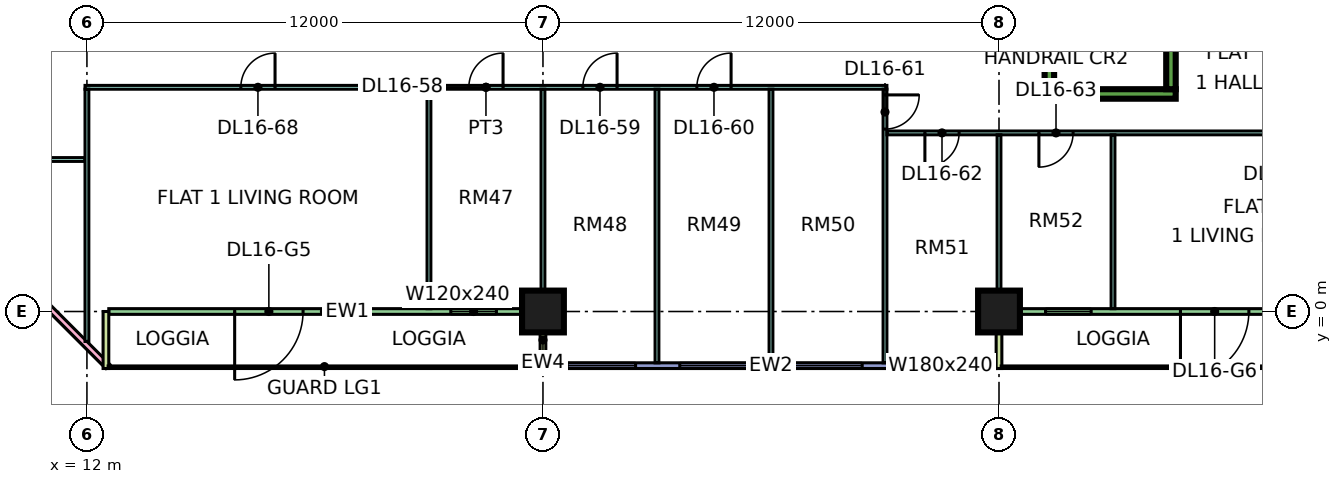
"""IFC4 building model, lengths in metres.
Left out: names, types, materials, properties, quantities, classifications, styles, units other than length and angle.
Written with IfcOpenShell. Run it as: python <this file> out.ifc"""

import sys

from ifc_helpers import new_model, si_unit, direction, frame, frame_2d, origin, origin_2d, place, context, subcontext, project, spatial, rectangle, extrude, element, fill, save


model = new_model("IFC4")
c1 = context("Model", 3, precision=1e-05, world=origin(), true_north=direction((0.0, 1.0)))
c2 = subcontext(c1, "Body", "Model", "MODEL_VIEW")
j1 = project(units=[si_unit("LENGTHUNIT", "METRE"), si_unit("PLANEANGLEUNIT", "RADIAN")], contexts=[c1])
p1 = place(None, origin())
s1 = spatial("IfcSite", under=j1, at=p1, CompositionType="ELEMENT")
p2 = place(p1, origin())
s2 = spatial("IfcBuilding", under=s1, at=p2, CompositionType="ELEMENT")
p3 = place(p2, frame((0.0, 0.0, 75.15)))
s3 = spatial("IfcBuildingStorey", under=s2, at=p3, CompositionType="ELEMENT", Elevation=75.15)
for number, where, z_axis, x_axis in (
    (1, (24.0, 0.0, 0.0), (0.0, 0.0, 1.0), (1.0, 0.0, 0.0)),
    (2, (36.0, 0.0, 0.0), (0.0, 0.0, 1.0), (1.0, 0.0, 0.0)),
):
    element("IfcColumn", number, at=place(p3, frame(where, z_axis=z_axis, x_axis=x_axis)), inside=s3, PredefinedType="COLUMN", context=c2, shape_type="SweptSolid", body=[
        extrude(rectangle(XDim=1.1, YDim=1.1, at=origin_2d()), origin(), (0.0, 0.0, 1.0), 3.75),
    ])
p4 = place(p3, frame((37.2, 5.725, 0.0), z_axis=(0.0, 0.0, 1.0), x_axis=(1.0, 0.0, 0.0)))
e3 = element("IfcWall", 3, at=p4, inside=s3, PredefinedType="SHEAR", context=c2, shape_type="SweptSolid", body=[
    extrude(rectangle(XDim=3.45, YDim=0.25, at=frame_2d((1.725, 0.0))), origin(), (0.0, 0.0, 1.0), 3.75),
])
for number, where, z_axis, x_axis in (
    (4, (37.325, 5.85, 0.0), (0.0, 0.0, 1.0), (0.0, 1.0, 0.0)),
    (5, (40.525, 5.85, 0.0), (0.0, 0.0, 1.0), (0.0, 1.0, 0.0)),
):
    element("IfcWall", number, at=place(p3, frame(where, z_axis=z_axis, x_axis=x_axis)), inside=s3, PredefinedType="SHEAR", context=c2, shape_type="SweptSolid", body=[
        extrude(rectangle(XDim=6.5, YDim=0.25, at=frame_2d((3.25, 0.0))), origin(), (0.0, 0.0, 1.0), 3.75),
    ])
p5 = place(p3, frame((-1.447, 12.553, 0.0), z_axis=(0.0, 0.0, 1.0), x_axis=(0.707106781187, -0.707106781187, 0.0)))
e6 = element("IfcWall", 6, at=p5, inside=s3, PredefinedType="SOLIDWALL", context=c2, shape_type="SweptSolid", body=[
    extrude(rectangle(XDim=19.799, YDim=0.15, at=frame_2d((9.899, 0.0))), origin(), (0.0, 0.0, 1.0), 3.35),
])
p6 = place(p5, frame((2.212, 0.0, 0.45)))
e7 = element("IfcOpeningElement", 7, at=p6, cuts=e6, PredefinedType="OPENING", context=c2, shape_type="SweptSolid", body=[
    extrude(rectangle(XDim=3.0, YDim=2.4, at=frame_2d((1.5, 1.2))), frame((0.0, 0.085, 0.0), z_axis=(0.0, -1.0, 0.0), x_axis=(1.0, 0.0, 0.0)), (0.0, 0.0, 1.0), 0.17),
])
p7 = place(p5, frame((10.216, 0.0, 0.45)))
e8 = element("IfcOpeningElement", 8, at=p7, cuts=e6, PredefinedType="OPENING", context=c2, shape_type="SweptSolid", body=[
    extrude(rectangle(XDim=3.0, YDim=2.4, at=frame_2d((1.5, 1.2))), frame((0.0, 0.085, 0.0), z_axis=(0.0, -1.0, 0.0), x_axis=(1.0, 0.0, 0.0)), (0.0, 0.0, 1.0), 0.17),
])
p8 = place(p3, frame((12.575, 0.0, 0.0), z_axis=(0.0, 0.0, 1.0), x_axis=(1.0, 0.0, 0.0)))
e9 = element("IfcWall", 9, at=p8, inside=s3, PredefinedType="SOLIDWALL", context=c2, shape_type="SweptSolid", body=[
    extrude(rectangle(XDim=11.35, YDim=0.15, at=frame_2d((5.675, 0.0))), origin(), (0.0, 0.0, 1.0), 3.35),
])
p9 = place(p8, frame((3.312, 0.0, 0.0)))
e10 = element("IfcOpeningElement", 10, at=p9, cuts=e9, PredefinedType="OPENING", context=c2, shape_type="SweptSolid", body=[
    extrude(rectangle(XDim=1.8, YDim=2.4, at=frame_2d((0.9, 1.2))), frame((0.0, 0.085, 0.0), z_axis=(0.0, -1.0, 0.0), x_axis=(1.0, 0.0, 0.0)), (0.0, 0.0, 1.0), 0.17),
])
p10 = place(p8, frame((9.0, 0.0, 0.45)))
e11 = element("IfcOpeningElement", 11, at=p10, cuts=e9, PredefinedType="OPENING", context=c2, shape_type="SweptSolid", body=[
    extrude(rectangle(XDim=1.2, YDim=2.4, at=frame_2d((0.6, 1.2))), frame((0.0, 0.085, 0.0), z_axis=(0.0, -1.0, 0.0), x_axis=(1.0, 0.0, 0.0)), (0.0, 0.0, 1.0), 0.17),
])
for number, where, z_axis, x_axis in (
    (12, (12.5, -1.5, 0.0), (0.0, 0.0, 1.0), (0.0, 1.0, 0.0)),
    (13, (24.0, -1.5, 0.0), (0.0, 0.0, 1.0), (0.0, 1.0, 0.0)),
):
    element("IfcWall", number, at=place(p3, frame(where, z_axis=z_axis, x_axis=x_axis)), inside=s3, PredefinedType="SOLIDWALL", context=c2, shape_type="SweptSolid", body=[
        extrude(rectangle(XDim=1.5, YDim=0.15, at=frame_2d((0.75, 0.0))), origin(), (0.0, 0.0, 1.0), 3.35),
    ])
p11 = place(p3, frame((24.075, -1.425, 0.0), z_axis=(0.0, 0.0, 1.0), x_axis=(1.0, 0.0, 0.0)))
e14 = element("IfcWall", 14, at=p11, inside=s3, PredefinedType="SOLIDWALL", context=c2, shape_type="SweptSolid", body=[
    extrude(rectangle(XDim=11.85, YDim=0.15, at=frame_2d((5.925, 0.0))), origin(), (0.0, 0.0, 1.0), 3.35),
])
p12 = place(p11, frame((0.562, 0.0, 0.45)))
e15 = element("IfcOpeningElement", 15, at=p12, cuts=e14, PredefinedType="OPENING", context=c2, shape_type="SweptSolid", body=[
    extrude(rectangle(XDim=1.8, YDim=2.4, at=frame_2d((0.9, 1.2))), frame((0.0, 0.085, 0.0), z_axis=(0.0, -1.0, 0.0), x_axis=(1.0, 0.0, 0.0)), (0.0, 0.0, 1.0), 0.17),
])
p13 = place(p11, frame((3.525, 0.0, 0.45)))
e16 = element("IfcOpeningElement", 16, at=p13, cuts=e14, PredefinedType="OPENING", context=c2, shape_type="SweptSolid", body=[
    extrude(rectangle(XDim=1.8, YDim=2.4, at=frame_2d((0.9, 1.2))), frame((0.0, 0.085, 0.0), z_axis=(0.0, -1.0, 0.0), x_axis=(1.0, 0.0, 0.0)), (0.0, 0.0, 1.0), 0.17),
])
p14 = place(p11, frame((6.525, 0.0, 0.45)))
e17 = element("IfcOpeningElement", 17, at=p14, cuts=e14, PredefinedType="OPENING", context=c2, shape_type="SweptSolid", body=[
    extrude(rectangle(XDim=1.8, YDim=2.4, at=frame_2d((0.9, 1.2))), frame((0.0, 0.085, 0.0), z_axis=(0.0, -1.0, 0.0), x_axis=(1.0, 0.0, 0.0)), (0.0, 0.0, 1.0), 0.17),
])
p15 = place(p11, frame((9.488, 0.0, 0.45)))
e18 = element("IfcOpeningElement", 18, at=p15, cuts=e14, PredefinedType="OPENING", context=c2, shape_type="SweptSolid", body=[
    extrude(rectangle(XDim=1.8, YDim=2.4, at=frame_2d((0.9, 1.2))), frame((0.0, 0.085, 0.0), z_axis=(0.0, -1.0, 0.0), x_axis=(1.0, 0.0, 0.0)), (0.0, 0.0, 1.0), 0.17),
])
p16 = place(p3, frame((36.075, 0.0, 0.0), z_axis=(0.0, 0.0, 1.0), x_axis=(1.0, 0.0, 0.0)))
e19 = element("IfcWall", 19, at=p16, inside=s3, PredefinedType="SOLIDWALL", context=c2, shape_type="SweptSolid", body=[
    extrude(rectangle(XDim=11.85, YDim=0.15, at=frame_2d((5.925, 0.0))), origin(), (0.0, 0.0, 1.0), 3.35),
])
p17 = place(p16, frame((1.15, 0.0, 0.45)))
e20 = element("IfcOpeningElement", 20, at=p17, cuts=e19, PredefinedType="OPENING", context=c2, shape_type="SweptSolid", body=[
    extrude(rectangle(XDim=1.2, YDim=2.4, at=frame_2d((0.6, 1.2))), frame((0.0, 0.085, 0.0), z_axis=(0.0, -1.0, 0.0), x_axis=(1.0, 0.0, 0.0)), (0.0, 0.0, 1.0), 0.17),
])
p18 = place(p16, frame((4.7, 0.0, 0.0)))
e21 = element("IfcOpeningElement", 21, at=p18, cuts=e19, PredefinedType="OPENING", context=c2, shape_type="SweptSolid", body=[
    extrude(rectangle(XDim=1.8, YDim=2.4, at=frame_2d((0.9, 1.2))), frame((0.0, 0.085, 0.0), z_axis=(0.0, -1.0, 0.0), x_axis=(1.0, 0.0, 0.0)), (0.0, 0.0, 1.0), 0.17),
])
p19 = place(p16, frame((10.113, 0.0, 0.45)))
e22 = element("IfcOpeningElement", 22, at=p19, cuts=e19, PredefinedType="OPENING", context=c2, shape_type="SweptSolid", body=[
    extrude(rectangle(XDim=1.2, YDim=2.4, at=frame_2d((0.6, 1.2))), frame((0.0, 0.085, 0.0), z_axis=(0.0, -1.0, 0.0), x_axis=(1.0, 0.0, 0.0)), (0.0, 0.0, 1.0), 0.17),
])
p20 = place(p3, frame((36.0, -1.5, 0.0), z_axis=(0.0, 0.0, 1.0), x_axis=(0.0, 1.0, 0.0)))
e23 = element("IfcWall", 23, at=p20, inside=s3, PredefinedType="SOLIDWALL", context=c2, shape_type="SweptSolid", body=[
    extrude(rectangle(XDim=1.5, YDim=0.15, at=frame_2d((0.75, 0.0))), origin(), (0.0, 0.0, 1.0), 3.35),
])
p21 = place(p3, frame((9.05, 4.0, 0.0), z_axis=(0.0, 0.0, 1.0), x_axis=(1.0, 0.0, 0.0)))
e24 = element("IfcWall", 24, at=p21, inside=s3, PredefinedType="PARTITIONING", context=c2, shape_type="SweptSolid", body=[
    extrude(rectangle(XDim=2.9, YDim=0.1, at=frame_2d((1.45, 0.0))), origin(), (0.0, 0.0, 1.0), 3.35),
])
p22 = place(p3, frame((11.95, 5.9, 0.0), z_axis=(0.0, 0.0, 1.0), x_axis=(1.0, 0.0, 0.0)))
e25 = element("IfcWall", 25, at=p22, inside=s3, PredefinedType="PARTITIONING", context=c2, shape_type="SweptSolid", body=[
    extrude(rectangle(XDim=21.1, YDim=0.1, at=frame_2d((10.55, 0.0))), origin(), (0.0, 0.0, 1.0), 3.35),
])
p23 = place(p22, frame((10.1, 0.0, 0.0)))
e26 = element("IfcOpeningElement", 26, at=p23, cuts=e25, PredefinedType="OPENING", context=c2, shape_type="SweptSolid", body=[
    extrude(rectangle(XDim=0.9, YDim=2.1, at=frame_2d((0.45, 1.05))), frame((0.0, 0.06, 0.0), z_axis=(0.0, -1.0, 0.0), x_axis=(1.0, 0.0, 0.0)), (0.0, 0.0, 1.0), 0.12),
])
p24 = place(p22, frame((13.1, 0.0, 0.0)))
e27 = element("IfcOpeningElement", 27, at=p24, cuts=e25, PredefinedType="OPENING", context=c2, shape_type="SweptSolid", body=[
    extrude(rectangle(XDim=0.9, YDim=2.1, at=frame_2d((0.45, 1.05))), frame((0.0, 0.06, 0.0), z_axis=(0.0, -1.0, 0.0), x_axis=(1.0, 0.0, 0.0)), (0.0, 0.0, 1.0), 0.12),
])
p25 = place(p22, frame((16.1, 0.0, 0.0)))
e28 = element("IfcOpeningElement", 28, at=p25, cuts=e25, PredefinedType="OPENING", context=c2, shape_type="SweptSolid", body=[
    extrude(rectangle(XDim=0.9, YDim=2.1, at=frame_2d((0.45, 1.05))), frame((0.0, 0.06, 0.0), z_axis=(0.0, -1.0, 0.0), x_axis=(1.0, 0.0, 0.0)), (0.0, 0.0, 1.0), 0.12),
])
p26 = place(p22, frame((4.1, 0.0, 0.0)))
e29 = element("IfcOpeningElement", 29, at=p26, cuts=e25, PredefinedType="OPENING", context=c2, shape_type="SweptSolid", body=[
    extrude(rectangle(XDim=0.9, YDim=2.1, at=frame_2d((0.45, 1.05))), frame((0.0, 0.06, 0.0), z_axis=(0.0, -1.0, 0.0), x_axis=(1.0, 0.0, 0.0)), (0.0, 0.0, 1.0), 0.12),
])
p27 = place(p3, frame((12.0, -0.788, 0.0), z_axis=(0.0, 0.0, 1.0), x_axis=(0.0, 1.0, 0.0)))
e30 = element("IfcWall", 30, at=p27, inside=s3, PredefinedType="PARTITIONING", context=c2, shape_type="SweptSolid", body=[
    extrude(rectangle(XDim=6.638, YDim=0.1, at=frame_2d((3.319, 0.0))), origin(), (0.0, 0.0, 1.0), 3.35),
])
p28 = place(p3, frame((21.0, 0.074, 0.0), z_axis=(0.0, 0.0, 1.0), x_axis=(0.0, 1.0, 0.0)))
e31 = element("IfcWall", 31, at=p28, inside=s3, PredefinedType="PARTITIONING", context=c2, shape_type="SweptSolid", body=[
    extrude(rectangle(XDim=5.776, YDim=0.1, at=frame_2d((2.888, 0.0))), origin(), (0.0, 0.0, 1.0), 3.35),
])
p29 = place(p3, frame((24.0, 0.0, 0.0), z_axis=(0.0, 0.0, 1.0), x_axis=(0.0, 1.0, 0.0)))
e32 = element("IfcWall", 32, at=p29, inside=s3, PredefinedType="PARTITIONING", context=c2, shape_type="SweptSolid", body=[
    extrude(rectangle(XDim=5.85, YDim=0.1, at=frame_2d((2.925, 0.0))), origin(), (0.0, 0.0, 1.0), 3.35),
])
for number, where, z_axis, x_axis in (
    (33, (27.0, -1.351, 0.0), (0.0, 0.0, 1.0), (0.0, 1.0, 0.0)),
    (34, (30.0, -1.351, 0.0), (0.0, 0.0, 1.0), (0.0, 1.0, 0.0)),
):
    element("IfcWall", number, at=place(p3, frame(where, z_axis=z_axis, x_axis=x_axis)), inside=s3, PredefinedType="PARTITIONING", context=c2, shape_type="SweptSolid", body=[
        extrude(rectangle(XDim=7.201, YDim=0.1, at=frame_2d((3.601, 0.0))), origin(), (0.0, 0.0, 1.0), 3.35),
    ])
p30 = place(p3, frame((33.0, -1.351, 0.0), z_axis=(0.0, 0.0, 1.0), x_axis=(0.0, 1.0, 0.0)))
e35 = element("IfcWall", 35, at=p30, inside=s3, PredefinedType="PARTITIONING", context=c2, shape_type="SweptSolid", body=[
    extrude(rectangle(XDim=7.201, YDim=0.1, at=frame_2d((3.601, 0.0))), origin(), (0.0, 0.0, 1.0), 3.35),
])
p31 = place(p30, frame((6.151, 0.0, 0.0)))
e36 = element("IfcOpeningElement", 36, at=p31, cuts=e35, PredefinedType="OPENING", context=c2, shape_type="SweptSolid", body=[
    extrude(rectangle(XDim=0.9, YDim=2.1, at=frame_2d((0.45, 1.05))), frame((0.0, 0.06, 0.0), z_axis=(0.0, -1.0, 0.0), x_axis=(1.0, 0.0, 0.0)), (0.0, 0.0, 1.0), 0.12),
])
p32 = place(p3, frame((33.05, 4.7, 0.0), z_axis=(0.0, 0.0, 1.0), x_axis=(1.0, 0.0, 0.0)))
e37 = element("IfcWall", 37, at=p32, inside=s3, PredefinedType="PARTITIONING", context=c2, shape_type="SweptSolid", body=[
    extrude(rectangle(XDim=14.85, YDim=0.1, at=frame_2d((7.425, 0.0))), origin(), (0.0, 0.0, 1.0), 3.35),
])
p33 = place(p32, frame((1.0, 0.0, 0.0)))
e38 = element("IfcOpeningElement", 38, at=p33, cuts=e37, PredefinedType="OPENING", context=c2, shape_type="SweptSolid", body=[
    extrude(rectangle(XDim=0.9, YDim=2.1, at=frame_2d((0.45, 1.05))), frame((0.0, 0.06, 0.0), z_axis=(0.0, -1.0, 0.0), x_axis=(1.0, 0.0, 0.0)), (0.0, 0.0, 1.0), 0.12),
])
p34 = place(p32, frame((4.0, 0.0, 0.0)))
e39 = element("IfcOpeningElement", 39, at=p34, cuts=e37, PredefinedType="OPENING", context=c2, shape_type="SweptSolid", body=[
    extrude(rectangle(XDim=0.9, YDim=2.1, at=frame_2d((0.45, 1.05))), frame((0.0, 0.06, 0.0), z_axis=(0.0, -1.0, 0.0), x_axis=(1.0, 0.0, 0.0)), (0.0, 0.0, 1.0), 0.12),
])
p35 = place(p32, frame((10.0, 0.0, 0.0)))
e40 = element("IfcOpeningElement", 40, at=p35, cuts=e37, PredefinedType="OPENING", context=c2, shape_type="SweptSolid", body=[
    extrude(rectangle(XDim=0.9, YDim=2.1, at=frame_2d((0.45, 1.05))), frame((0.0, 0.06, 0.0), z_axis=(0.0, -1.0, 0.0), x_axis=(1.0, 0.0, 0.0)), (0.0, 0.0, 1.0), 0.12),
])
p36 = place(p3, frame((36.0, 0.0, 0.0), z_axis=(0.0, 0.0, 1.0), x_axis=(0.0, 1.0, 0.0)))
e41 = element("IfcWall", 41, at=p36, inside=s3, PredefinedType="PARTITIONING", context=c2, shape_type="SweptSolid", body=[
    extrude(rectangle(XDim=4.65, YDim=0.1, at=frame_2d((2.325, 0.0))), origin(), (0.0, 0.0, 1.0), 3.35),
])
p37 = place(p3, frame((39.0, 0.074, 0.0), z_axis=(0.0, 0.0, 1.0), x_axis=(0.0, 1.0, 0.0)))
e42 = element("IfcWall", 42, at=p37, inside=s3, PredefinedType="PARTITIONING", context=c2, shape_type="SweptSolid", body=[
    extrude(rectangle(XDim=4.576, YDim=0.1, at=frame_2d((2.288, 0.0))), origin(), (0.0, 0.0, 1.0), 3.35),
])
p38 = place(p9, frame((1.8, 0.0, 0.0), z_axis=(0.0, 0.0, 1.0), x_axis=(-1.0, 0.0, 0.0)))
e43 = element("IfcDoor", 43, at=p38, inside=s3, OperationType="DOUBLE_DOOR_SINGLE_SWING", PredefinedType="DOOR", context=c2, shape_type="SweptSolid", body=[
    extrude(rectangle(XDim=1.8, YDim=2.4, at=frame_2d((0.9, 1.2))), frame((0.0, 0.025, 0.0), z_axis=(0.0, -1.0, 0.0), x_axis=(1.0, 0.0, 0.0)), (0.0, 0.0, 1.0), 0.05),
])
fill(e10, e43)
p39 = place(p10, origin())
e44 = element("IfcWindow", 44, at=p39, inside=s3, PartitioningType="SINGLE_PANEL", PredefinedType="WINDOW", context=c2, shape_type="SweptSolid", body=[
    extrude(rectangle(XDim=1.2, YDim=2.4, at=frame_2d((0.6, 1.2))), frame((0.0, 0.03, 0.0), z_axis=(0.0, -1.0, 0.0), x_axis=(1.0, 0.0, 0.0)), (0.0, 0.0, 1.0), 0.06),
])
fill(e11, e44)
p40 = place(p12, origin())
e45 = element("IfcWindow", 45, at=p40, inside=s3, PartitioningType="SINGLE_PANEL", PredefinedType="WINDOW", context=c2, shape_type="SweptSolid", body=[
    extrude(rectangle(XDim=1.8, YDim=2.4, at=frame_2d((0.9, 1.2))), frame((0.0, 0.03, 0.0), z_axis=(0.0, -1.0, 0.0), x_axis=(1.0, 0.0, 0.0)), (0.0, 0.0, 1.0), 0.06),
])
fill(e15, e45)
p41 = place(p13, origin())
e46 = element("IfcWindow", 46, at=p41, inside=s3, PartitioningType="SINGLE_PANEL", PredefinedType="WINDOW", context=c2, shape_type="SweptSolid", body=[
    extrude(rectangle(XDim=1.8, YDim=2.4, at=frame_2d((0.9, 1.2))), frame((0.0, 0.03, 0.0), z_axis=(0.0, -1.0, 0.0), x_axis=(1.0, 0.0, 0.0)), (0.0, 0.0, 1.0), 0.06),
])
fill(e16, e46)
p42 = place(p14, origin())
e47 = element("IfcWindow", 47, at=p42, inside=s3, PartitioningType="SINGLE_PANEL", PredefinedType="WINDOW", context=c2, shape_type="SweptSolid", body=[
    extrude(rectangle(XDim=1.8, YDim=2.4, at=frame_2d((0.9, 1.2))), frame((0.0, 0.03, 0.0), z_axis=(0.0, -1.0, 0.0), x_axis=(1.0, 0.0, 0.0)), (0.0, 0.0, 1.0), 0.06),
])
fill(e17, e47)
p43 = place(p15, origin())
e48 = element("IfcWindow", 48, at=p43, inside=s3, PartitioningType="SINGLE_PANEL", PredefinedType="WINDOW", context=c2, shape_type="SweptSolid", body=[
    extrude(rectangle(XDim=1.8, YDim=2.4, at=frame_2d((0.9, 1.2))), frame((0.0, 0.03, 0.0), z_axis=(0.0, -1.0, 0.0), x_axis=(1.0, 0.0, 0.0)), (0.0, 0.0, 1.0), 0.06),
])
fill(e18, e48)
p44 = place(p17, origin())
e49 = element("IfcWindow", 49, at=p44, inside=s3, PartitioningType="SINGLE_PANEL", PredefinedType="WINDOW", context=c2, shape_type="SweptSolid", body=[
    extrude(rectangle(XDim=1.2, YDim=2.4, at=frame_2d((0.6, 1.2))), frame((0.0, 0.03, 0.0), z_axis=(0.0, -1.0, 0.0), x_axis=(1.0, 0.0, 0.0)), (0.0, 0.0, 1.0), 0.06),
])
fill(e20, e49)
p45 = place(p18, frame((1.8, 0.0, 0.0), z_axis=(0.0, 0.0, 1.0), x_axis=(-1.0, 0.0, 0.0)))
e50 = element("IfcDoor", 50, at=p45, inside=s3, OperationType="DOUBLE_DOOR_SINGLE_SWING", PredefinedType="DOOR", context=c2, shape_type="SweptSolid", body=[
    extrude(rectangle(XDim=1.8, YDim=2.4, at=frame_2d((0.9, 1.2))), frame((0.0, 0.025, 0.0), z_axis=(0.0, -1.0, 0.0), x_axis=(1.0, 0.0, 0.0)), (0.0, 0.0, 1.0), 0.05),
])
fill(e21, e50)
p46 = place(p23, frame((0.9, 0.0, 0.0), z_axis=(0.0, 0.0, 1.0), x_axis=(-1.0, 0.0, 0.0)))
e51 = element("IfcDoor", 51, at=p46, inside=s3, OperationType="SINGLE_SWING_RIGHT", PredefinedType="DOOR", context=c2, shape_type="SweptSolid", body=[
    extrude(rectangle(XDim=0.9, YDim=2.1, at=frame_2d((0.45, 1.05))), frame((0.0, 0.025, 0.0), z_axis=(0.0, -1.0, 0.0), x_axis=(1.0, 0.0, 0.0)), (0.0, 0.0, 1.0), 0.05),
])
fill(e26, e51)
p47 = place(p24, frame((0.9, 0.0, 0.0), z_axis=(0.0, 0.0, 1.0), x_axis=(-1.0, 0.0, 0.0)))
e52 = element("IfcDoor", 52, at=p47, inside=s3, OperationType="SINGLE_SWING_RIGHT", PredefinedType="DOOR", context=c2, shape_type="SweptSolid", body=[
    extrude(rectangle(XDim=0.9, YDim=2.1, at=frame_2d((0.45, 1.05))), frame((0.0, 0.025, 0.0), z_axis=(0.0, -1.0, 0.0), x_axis=(1.0, 0.0, 0.0)), (0.0, 0.0, 1.0), 0.05),
])
fill(e27, e52)
p48 = place(p25, frame((0.9, 0.0, 0.0), z_axis=(0.0, 0.0, 1.0), x_axis=(-1.0, 0.0, 0.0)))
e53 = element("IfcDoor", 53, at=p48, inside=s3, OperationType="SINGLE_SWING_RIGHT", PredefinedType="DOOR", context=c2, shape_type="SweptSolid", body=[
    extrude(rectangle(XDim=0.9, YDim=2.1, at=frame_2d((0.45, 1.05))), frame((0.0, 0.025, 0.0), z_axis=(0.0, -1.0, 0.0), x_axis=(1.0, 0.0, 0.0)), (0.0, 0.0, 1.0), 0.05),
])
fill(e28, e53)
p49 = place(p31, origin())
e54 = element("IfcDoor", 54, at=p49, inside=s3, OperationType="SINGLE_SWING_RIGHT", PredefinedType="DOOR", context=c2, shape_type="SweptSolid", body=[
    extrude(rectangle(XDim=0.9, YDim=2.1, at=frame_2d((0.45, 1.05))), frame((0.0, 0.025, 0.0), z_axis=(0.0, -1.0, 0.0), x_axis=(1.0, 0.0, 0.0)), (0.0, 0.0, 1.0), 0.05),
])
fill(e36, e54)
p50 = place(p33, frame((0.9, 0.0, 0.0), z_axis=(0.0, 0.0, 1.0), x_axis=(-1.0, 0.0, 0.0)))
e55 = element("IfcDoor", 55, at=p50, inside=s3, OperationType="SINGLE_SWING_LEFT", PredefinedType="DOOR", context=c2, shape_type="SweptSolid", body=[
    extrude(rectangle(XDim=0.9, YDim=2.1, at=frame_2d((0.45, 1.05))), frame((0.0, 0.025, 0.0), z_axis=(0.0, -1.0, 0.0), x_axis=(1.0, 0.0, 0.0)), (0.0, 0.0, 1.0), 0.05),
])
fill(e38, e55)
p51 = place(p34, frame((0.9, 0.0, 0.0), z_axis=(0.0, 0.0, 1.0), x_axis=(-1.0, 0.0, 0.0)))
e56 = element("IfcDoor", 56, at=p51, inside=s3, OperationType="SINGLE_SWING_LEFT", PredefinedType="DOOR", context=c2, shape_type="SweptSolid", body=[
    extrude(rectangle(XDim=0.9, YDim=2.1, at=frame_2d((0.45, 1.05))), frame((0.0, 0.025, 0.0), z_axis=(0.0, -1.0, 0.0), x_axis=(1.0, 0.0, 0.0)), (0.0, 0.0, 1.0), 0.05),
])
fill(e39, e56)
p52 = place(p26, frame((0.9, 0.0, 0.0), z_axis=(0.0, 0.0, 1.0), x_axis=(-1.0, 0.0, 0.0)))
e57 = element("IfcDoor", 57, at=p52, inside=s3, OperationType="SINGLE_SWING_RIGHT", PredefinedType="DOOR", context=c2, shape_type="SweptSolid", body=[
    extrude(rectangle(XDim=0.9, YDim=2.1, at=frame_2d((0.45, 1.05))), frame((0.0, 0.025, 0.0), z_axis=(0.0, -1.0, 0.0), x_axis=(1.0, 0.0, 0.0)), (0.0, 0.0, 1.0), 0.05),
])
fill(e29, e57)
save(model, sys.argv[1])
